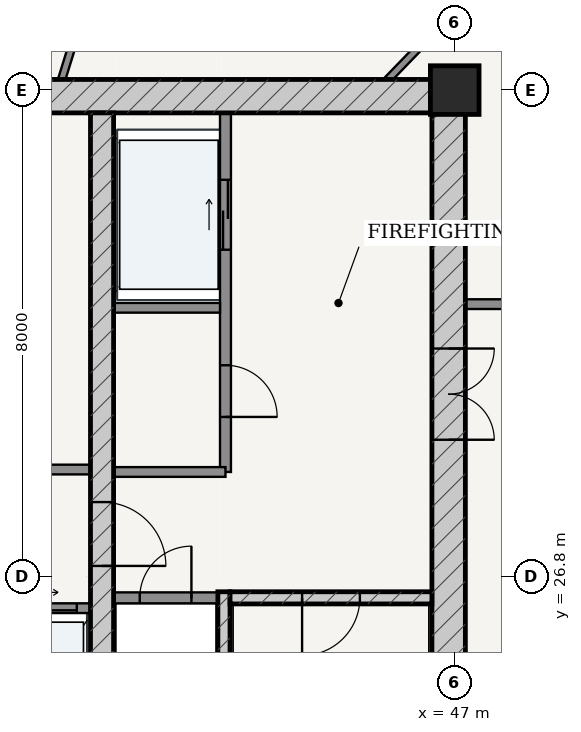
"""IFC4 building model, lengths in metres.
Left out: names, types, materials, properties, quantities, classifications, styles, units other than length and angle.
Written with IfcOpenShell. Run it as: python <this file> out.ifc"""

import sys

from ifc_helpers import new_model, si_unit, direction, frame, frame_2d, origin, origin_2d, place, context, subcontext, project, spatial, rectangle, extrude, source, transform, mapped, element, fill, save


model = new_model("IFC4")
c1 = context("Model", 3, precision=1e-05, world=origin(), true_north=direction((-0.2419218956, 0.970295726276)))
c2 = subcontext(c1, "Body", "Model", "MODEL_VIEW")
j1 = project(units=[si_unit("LENGTHUNIT", "METRE"), si_unit("PLANEANGLEUNIT", "RADIAN")], contexts=[c1])
p1 = place(None, origin())
s1 = spatial("IfcSite", under=j1, at=p1, CompositionType="ELEMENT")
p2 = place(p1, origin())
s2 = spatial("IfcBuilding", under=s1, at=p2, CompositionType="ELEMENT")
p3 = place(p2, frame((0.0, 0.0, 278.2)))
s3 = spatial("IfcBuildingStorey", under=s2, at=p3, CompositionType="ELEMENT", Elevation=278.2)
p4 = place(p3, frame((47.0, 34.8, 0.0), z_axis=(0.0, 0.0, 1.0), x_axis=(1.0, 0.0, 0.0)))
e1 = element("IfcColumn", 1, at=p4, inside=s3, PredefinedType="COLUMN", context=c2, shape_type="SweptSolid", body=[
    extrude(rectangle(XDim=0.8, YDim=0.8, at=origin_2d()), origin(), (0.0, 0.0, 1.0), 3.75),
])
p5 = place(p3, frame((28.825, 34.7, 0.0), z_axis=(0.0, 0.0, 1.0), x_axis=(1.0, 0.0, 0.0)))
e2 = element("IfcWall", 2, at=p5, inside=s3, PredefinedType="SHEAR", context=c2, shape_type="SweptSolid", body=[
    extrude(rectangle(XDim=18.35, YDim=0.55, at=frame_2d((9.175, 0.0))), origin(), (0.0, 0.0, 1.0), 3.49),
])
p6 = place(p3, frame((46.9, 19.175, 0.0), z_axis=(0.0, 0.0, 1.0), x_axis=(0.0, 1.0, 0.0)))
e3 = element("IfcWall", 3, at=p6, inside=s3, PredefinedType="SHEAR", context=c2, shape_type="SweptSolid", body=[
    extrude(rectangle(XDim=15.25, YDim=0.55, at=frame_2d((7.625, 0.0))), origin(), (0.0, 0.0, 1.0), 3.49),
])
p7 = place(p6, frame((9.875, 0.0, 0.0)))
e4 = element("IfcOpeningElement", 4, at=p7, cuts=e3, PredefinedType="OPENING", context=c2, shape_type="SweptSolid", body=[
    extrude(rectangle(XDim=1.5, YDim=2.2, at=frame_2d((0.75, 1.1))), frame((0.0, 0.285, 0.0), z_axis=(0.0, -1.0, 0.0), x_axis=(1.0, 0.0, 0.0)), (0.0, 0.0, 1.0), 0.57),
])
p8 = place(p3, frame((43.205, 19.175, 0.0), z_axis=(0.0, 0.0, 1.0), x_axis=(0.0, 1.0, 0.0)))
e5 = element("IfcWall", 5, at=p8, inside=s3, PredefinedType="SOLIDWALL", context=c2, shape_type="SweptSolid", body=[
    extrude(rectangle(XDim=7.375, YDim=0.2, at=frame_2d((3.688, 0.0))), origin(), (0.0, 0.0, 1.0), 3.49),
])
p9 = place(p3, frame((43.305, 26.45, 0.0), z_axis=(0.0, 0.0, 1.0), x_axis=(1.0, 0.0, 0.0)))
e6 = element("IfcWall", 6, at=p9, inside=s3, PredefinedType="SOLIDWALL", context=c2, shape_type="SweptSolid", body=[
    extrude(rectangle(XDim=3.32, YDim=0.2, at=frame_2d((1.66, 0.0))), origin(), (0.0, 0.0, 1.0), 3.49),
])
p10 = place(p9, frame((1.185, 0.0, 0.0)))
e7 = element("IfcOpeningElement", 7, at=p10, cuts=e6, PredefinedType="OPENING", context=c2, shape_type="SweptSolid", body=[
    extrude(rectangle(XDim=0.95, YDim=2.15, at=frame_2d((0.475, 1.075))), frame((0.0, 0.11, 0.0), z_axis=(0.0, -1.0, 0.0), x_axis=(1.0, 0.0, 0.0)), (0.0, 0.0, 1.0), 0.22),
])
p11 = place(p3, frame((41.2, 19.175, 0.0), z_axis=(0.0, 0.0, 1.0), x_axis=(0.0, 1.0, 0.0)))
e8 = element("IfcWall", 8, at=p11, inside=s3, PredefinedType="SHEAR", context=c2, shape_type="SweptSolid", body=[
    extrude(rectangle(XDim=15.25, YDim=0.38, at=frame_2d((7.625, 0.0))), origin(), (0.0, 0.0, 1.0), 3.49),
])
p12 = place(p11, frame((7.8, 0.0, 0.0)))
e9 = element("IfcOpeningElement", 9, at=p12, cuts=e8, PredefinedType="OPENING", context=c2, shape_type="SweptSolid", body=[
    extrude(rectangle(XDim=1.05, YDim=2.15, at=frame_2d((0.525, 1.075))), frame((0.0, 0.2, 0.0), z_axis=(0.0, -1.0, 0.0), x_axis=(1.0, 0.0, 0.0)), (0.0, 0.0, 1.0), 0.4),
])
p13 = place(p3, frame((41.39, 26.45, 0.0), z_axis=(0.0, 0.0, 1.0), x_axis=(1.0, 0.0, 0.0)))
e10 = element("IfcWall", 10, at=p13, inside=s3, PredefinedType="PARTITIONING", context=c2, shape_type="SweptSolid", body=[
    extrude(rectangle(XDim=1.71, YDim=0.18, at=frame_2d((0.855, 0.0))), origin(), (0.0, 0.0, 1.0), 3.49),
])
p14 = place(p13, frame((0.43, 0.0, 0.0)))
e11 = element("IfcOpeningElement", 11, at=p14, cuts=e10, PredefinedType="OPENING", context=c2, shape_type="SweptSolid", body=[
    extrude(rectangle(XDim=0.85, YDim=2.1, at=frame_2d((0.425, 1.05))), frame((0.0, 0.1, 0.0), z_axis=(0.0, -1.0, 0.0), x_axis=(1.0, 0.0, 0.0)), (0.0, 0.0, 1.0), 0.2),
])
p15 = place(p3, frame((43.23, 28.52, 0.0), z_axis=(0.0, 0.0, 1.0), x_axis=(0.0, 1.0, 0.0)))
e12 = element("IfcWall", 12, at=p15, inside=s3, PredefinedType="PARTITIONING", context=c2, shape_type="SweptSolid", body=[
    extrude(rectangle(XDim=5.905, YDim=0.18, at=frame_2d((2.953, 0.0))), origin(), (0.0, 0.0, 1.0), 3.49),
])
p16 = place(p15, frame((0.905, 0.0, 0.0)))
e13 = element("IfcOpeningElement", 13, at=p16, cuts=e12, PredefinedType="OPENING", context=c2, shape_type="SweptSolid", body=[
    extrude(rectangle(XDim=0.85, YDim=2.1, at=frame_2d((0.425, 1.05))), frame((0.0, 0.1, 0.0), z_axis=(0.0, -1.0, 0.0), x_axis=(1.0, 0.0, 0.0)), (0.0, 0.0, 1.0), 0.2),
])
p17 = place(p15, frame((3.655, 0.0, 0.0)))
e14 = element("IfcOpeningElement", 14, at=p17, cuts=e12, PredefinedType="OPENING", context=c2, shape_type="SweptSolid", body=[
    extrude(rectangle(XDim=1.15, YDim=2.2, at=frame_2d((0.575, 1.1))), frame((0.0, 0.1, 0.0), z_axis=(0.0, -1.0, 0.0), x_axis=(1.0, 0.0, 0.0)), (0.0, 0.0, 1.0), 0.2),
])
p18 = place(p3, frame((41.39, 31.22, 0.0), z_axis=(0.0, 0.0, 1.0), x_axis=(1.0, 0.0, 0.0)))
e15 = element("IfcWall", 15, at=p18, inside=s3, PredefinedType="PARTITIONING", context=c2, shape_type="SweptSolid", body=[
    extrude(rectangle(XDim=1.75, YDim=0.16, at=frame_2d((0.875, 0.0))), origin(), (0.0, 0.0, 1.0), 3.49),
])
p19 = place(p3, frame((41.39, 28.52, 0.0), z_axis=(0.0, 0.0, 1.0), x_axis=(1.0, 0.0, 0.0)))
e16 = element("IfcWall", 16, at=p19, inside=s3, PredefinedType="PARTITIONING", context=c2, shape_type="SweptSolid", body=[
    extrude(rectangle(XDim=1.84, YDim=0.16, at=frame_2d((0.92, 0.0))), origin(), (0.0, 0.0, 1.0), 3.49),
])
p20 = place(p3, frame((34.99, 28.56, 0.0), z_axis=(0.0, 0.0, 1.0), x_axis=(1.0, 0.0, 0.0)))
e17 = element("IfcWall", 17, at=p20, inside=s3, PredefinedType="PARTITIONING", context=c2, shape_type="SweptSolid", body=[
    extrude(rectangle(XDim=6.02, YDim=0.16, at=frame_2d((3.01, 0.0))), origin(), (0.0, 0.0, 1.0), 3.49),
])
p21 = place(p20, frame((1.025, 0.0, 0.0)))
e18 = element("IfcOpeningElement", 18, at=p21, cuts=e17, PredefinedType="OPENING", context=c2, shape_type="SweptSolid", body=[
    extrude(rectangle(XDim=0.86, YDim=2.1, at=frame_2d((0.43, 1.05))), frame((0.0, 0.09, 0.0), z_axis=(0.0, -1.0, 0.0), x_axis=(1.0, 0.0, 0.0)), (0.0, 0.0, 1.0), 0.18),
])
p22 = place(p20, frame((4.14, 0.0, 0.0)))
e19 = element("IfcOpeningElement", 19, at=p22, cuts=e17, PredefinedType="OPENING", context=c2, shape_type="SweptSolid", body=[
    extrude(rectangle(XDim=0.85, YDim=2.1, at=frame_2d((0.425, 1.05))), frame((0.0, 0.09, 0.0), z_axis=(0.0, -1.0, 0.0), x_axis=(1.0, 0.0, 0.0)), (0.0, 0.0, 1.0), 0.18),
])
p23 = place(p3, frame((34.99, 26.28, 0.0), z_axis=(0.0, 0.0, 1.0), x_axis=(1.0, 0.0, 0.0)))
e20 = element("IfcWall", 20, at=p23, inside=s3, PredefinedType="PARTITIONING", context=c2, shape_type="SweptSolid", body=[
    extrude(rectangle(XDim=6.02, YDim=0.16, at=frame_2d((3.01, 0.0))), origin(), (0.0, 0.0, 1.0), 3.49),
])
p24 = place(p23, frame((1.045, 0.0, 0.0)))
e21 = element("IfcOpeningElement", 21, at=p24, cuts=e20, PredefinedType="OPENING", context=c2, shape_type="SweptSolid", body=[
    extrude(rectangle(XDim=0.85, YDim=2.1, at=frame_2d((0.425, 1.05))), frame((0.0, 0.09, 0.0), z_axis=(0.0, -1.0, 0.0), x_axis=(1.0, 0.0, 0.0)), (0.0, 0.0, 1.0), 0.18),
])
p25 = place(p23, frame((3.215, 0.0, 0.0)))
e22 = element("IfcOpeningElement", 22, at=p25, cuts=e20, PredefinedType="OPENING", context=c2, shape_type="SweptSolid", body=[
    extrude(rectangle(XDim=1.1, YDim=2.2, at=frame_2d((0.55, 1.1))), frame((0.0, 0.09, 0.0), z_axis=(0.0, -1.0, 0.0), x_axis=(1.0, 0.0, 0.0)), (0.0, 0.0, 1.0), 0.18),
])
p26 = place(p23, frame((4.695, 0.0, 0.0)))
e23 = element("IfcOpeningElement", 23, at=p26, cuts=e20, PredefinedType="OPENING", context=c2, shape_type="SweptSolid", body=[
    extrude(rectangle(XDim=1.1, YDim=2.2, at=frame_2d((0.55, 1.1))), frame((0.0, 0.09, 0.0), z_axis=(0.0, -1.0, 0.0), x_axis=(1.0, 0.0, 0.0)), (0.0, 0.0, 1.0), 0.18),
])
p27 = place(p3, frame((47.175, 31.28, 0.0), z_axis=(0.0, 0.0, 1.0), x_axis=(1.0, 0.0, 0.0)))
e24 = element("IfcWall", 24, at=p27, inside=s3, PredefinedType="PARTITIONING", context=c2, shape_type="SweptSolid", body=[
    extrude(rectangle(XDim=1.93, YDim=0.16, at=frame_2d((0.965, 0.0))), origin(), (0.0, 0.0, 1.0), 3.49),
])
p28 = place(p3, frame((45.903, 34.976, 0.0), z_axis=(0.0, 0.0, 1.0), x_axis=(0.69497417129, 0.719034700999, 0.0)))
e25 = element("IfcWall", 25, at=p28, inside=s3, PredefinedType="PARTITIONING", context=c2, shape_type="SweptSolid", body=[
    extrude(rectangle(XDim=3.775, YDim=0.12, at=frame_2d((1.887, 0.0))), origin(), (0.0, 0.0, 1.0), 3.015),
])
p29 = place(p28, frame((1.437, 0.0, 0.0)))
e26 = element("IfcOpeningElement", 26, at=p29, cuts=e25, PredefinedType="OPENING", context=c2, shape_type="SweptSolid", body=[
    extrude(rectangle(XDim=0.9, YDim=2.15, at=frame_2d((0.45, 1.075))), frame((0.0, 0.07, 0.0), z_axis=(0.0, -1.0, 0.0), x_axis=(1.0, 0.0, 0.0)), (0.0, 0.0, 1.0), 0.14),
])
p30 = place(p3, frame((40.537, 34.977, 0.0), z_axis=(0.0, 0.0, 1.0), x_axis=(0.29633127961, 0.95508521752, 0.0)))
e27 = element("IfcWall", 27, at=p30, inside=s3, PredefinedType="PARTITIONING", context=c2, shape_type="SweptSolid", body=[
    extrude(rectangle(XDim=2.826, YDim=0.12, at=frame_2d((1.413, 0.0))), origin(), (0.0, 0.0, 1.0), 2.575),
])
p31 = place(p30, frame((0.963, 0.0, 0.0)))
e28 = element("IfcOpeningElement", 28, at=p31, cuts=e27, PredefinedType="OPENING", context=c2, shape_type="SweptSolid", body=[
    extrude(rectangle(XDim=0.9, YDim=2.15, at=frame_2d((0.45, 1.075))), frame((0.0, 0.07, 0.0), z_axis=(0.0, -1.0, 0.0), x_axis=(1.0, 0.0, 0.0)), (0.0, 0.0, 1.0), 0.14),
])
m1 = source(origin(), c2, "Body", "SweptSolid", [
    extrude(rectangle(XDim=1.5, YDim=2.2, at=frame_2d((0.75, 1.1))), frame((0.0, 0.025, 0.0), z_axis=(0.0, -1.0, 0.0), x_axis=(1.0, 0.0, 0.0)), (0.0, 0.0, 1.0), 0.05),
])
p32 = place(p7, frame((1.5, 0.0, 0.0), z_axis=(0.0, 0.0, 1.0), x_axis=(-1.0, 0.0, 0.0)))
e29 = element("IfcDoor", 29, at=p32, inside=s3, OperationType="DOUBLE_DOOR_SINGLE_SWING", PredefinedType="DOOR", context=c2, shape_type="MappedRepresentation", body=[
    mapped(m1, transform((0.0, 0.0, 0.0), scale=1.0)),
])
fill(e4, e29)
m2 = source(origin(), c2, "Body", "SweptSolid", [
    extrude(rectangle(XDim=1.05, YDim=2.15, at=frame_2d((0.525, 1.075))), frame((0.0, 0.025, 0.0), z_axis=(0.0, -1.0, 0.0), x_axis=(1.0, 0.0, 0.0)), (0.0, 0.0, 1.0), 0.05),
])
p33 = place(p12, frame((1.05, 0.0, 0.0), z_axis=(0.0, 0.0, 1.0), x_axis=(-1.0, 0.0, 0.0)))
e30 = element("IfcDoor", 30, at=p33, inside=s3, OperationType="SINGLE_SWING_RIGHT", PredefinedType="DOOR", context=c2, shape_type="MappedRepresentation", body=[
    mapped(m2, transform((0.0, 0.0, 0.0), scale=1.0)),
])
fill(e9, e30)
m3 = source(origin(), c2, "Body", "SweptSolid", [
    extrude(rectangle(XDim=0.95, YDim=2.15, at=frame_2d((0.475, 1.075))), frame((0.0, 0.025, 0.0), z_axis=(0.0, -1.0, 0.0), x_axis=(1.0, 0.0, 0.0)), (0.0, 0.0, 1.0), 0.05),
])
p34 = place(p10, frame((0.95, 0.0, 0.0), z_axis=(0.0, 0.0, 1.0), x_axis=(-1.0, 0.0, 0.0)))
e31 = element("IfcDoor", 31, at=p34, inside=s3, OperationType="SINGLE_SWING_RIGHT", PredefinedType="DOOR", context=c2, shape_type="MappedRepresentation", body=[
    mapped(m3, transform((0.0, 0.0, 0.0), scale=1.0)),
])
fill(e7, e31)
m4 = source(origin(), c2, "Body", "SweptSolid", [
    extrude(rectangle(XDim=0.85, YDim=2.1, at=frame_2d((0.425, 1.05))), frame((0.0, 0.025, 0.0), z_axis=(0.0, -1.0, 0.0), x_axis=(1.0, 0.0, 0.0)), (0.0, 0.0, 1.0), 0.05),
])
p35 = place(p14, origin())
e32 = element("IfcDoor", 32, at=p35, inside=s3, OperationType="SINGLE_SWING_RIGHT", PredefinedType="DOOR", context=c2, shape_type="MappedRepresentation", body=[
    mapped(m4, transform((0.0, 0.0, 0.0), scale=1.0)),
])
fill(e11, e32)
p36 = place(p16, frame((0.85, 0.0, 0.0), z_axis=(0.0, 0.0, 1.0), x_axis=(-1.0, 0.0, 0.0)))
e33 = element("IfcDoor", 33, at=p36, inside=s3, OperationType="SINGLE_SWING_RIGHT", PredefinedType="DOOR", context=c2, shape_type="MappedRepresentation", body=[
    mapped(m4, transform((0.0, 0.0, 0.0), scale=1.0)),
])
fill(e13, e33)
m5 = source(origin(), c2, "Body", "SweptSolid", [
    extrude(rectangle(XDim=1.15, YDim=2.2, at=frame_2d((0.575, 1.1))), frame((0.0, 0.025, 0.0), z_axis=(0.0, -1.0, 0.0), x_axis=(1.0, 0.0, 0.0)), (0.0, 0.0, 1.0), 0.05),
])
p37 = place(p17, origin())
e34 = element("IfcDoor", 34, at=p37, inside=s3, OperationType="DOUBLE_DOOR_SLIDING", PredefinedType="DOOR", context=c2, shape_type="MappedRepresentation", body=[
    mapped(m5, transform((0.0, 0.0, 0.0), scale=1.0)),
])
fill(e14, e34)
m6 = source(origin(), c2, "Body", "SweptSolid", [
    extrude(rectangle(XDim=1.1, YDim=2.2, at=frame_2d((0.55, 1.1))), frame((0.0, 0.025, 0.0), z_axis=(0.0, -1.0, 0.0), x_axis=(1.0, 0.0, 0.0)), (0.0, 0.0, 1.0), 0.05),
])
p38 = place(p26, origin())
e35 = element("IfcDoor", 35, at=p38, inside=s3, OperationType="DOUBLE_DOOR_SLIDING", PredefinedType="DOOR", context=c2, shape_type="MappedRepresentation", body=[
    mapped(m6, transform((0.0, 0.0, 0.0), scale=1.0)),
])
fill(e23, e35)
save(model, sys.argv[1])
